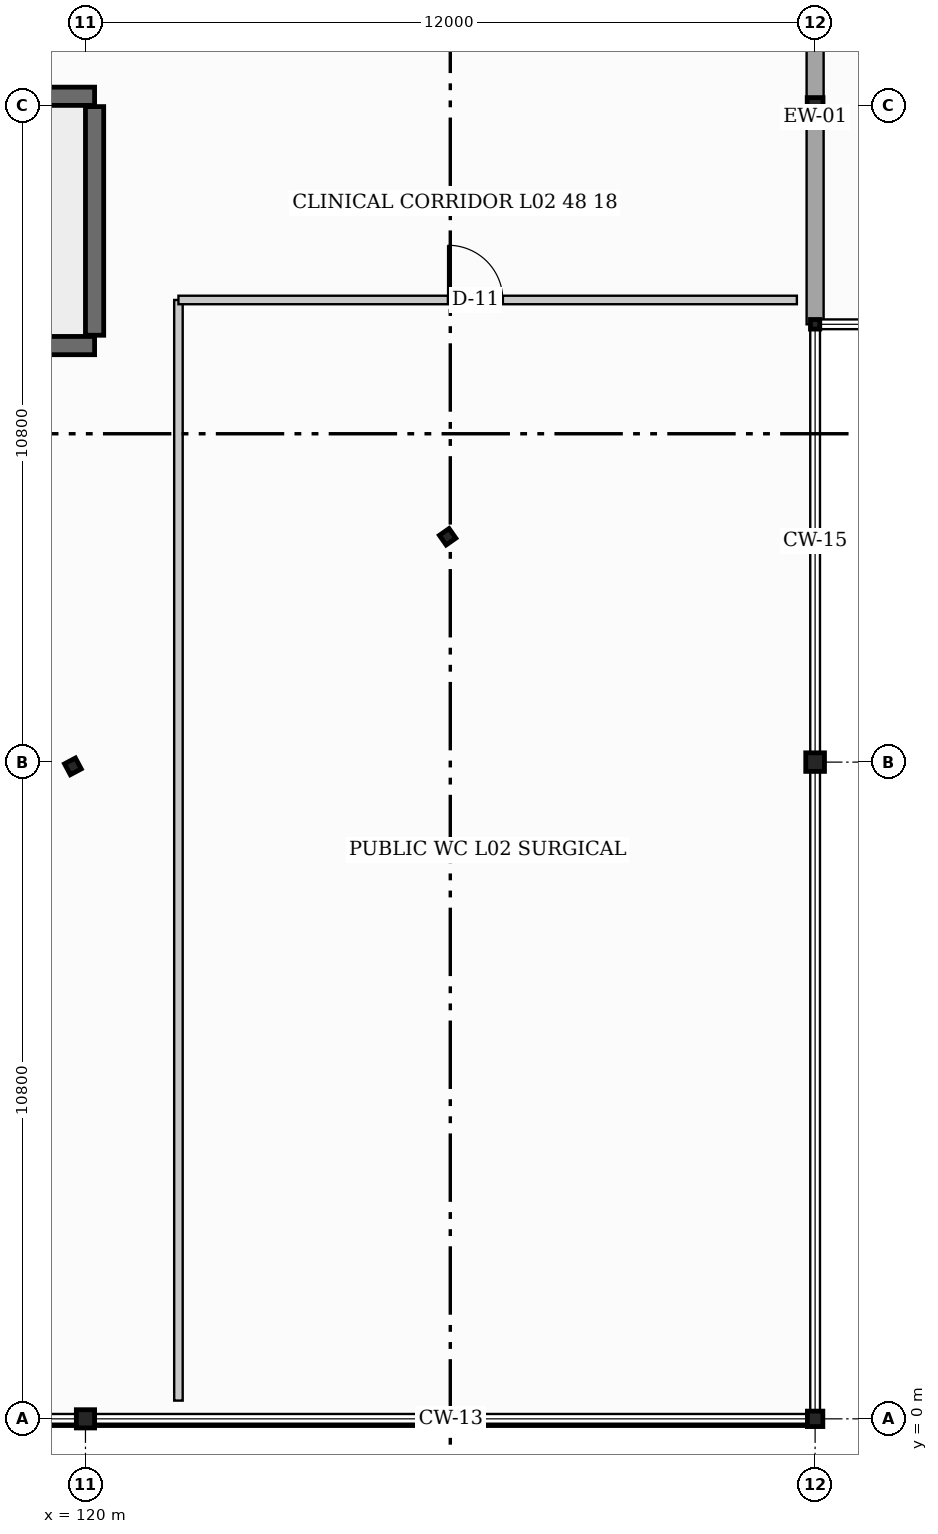
"""IFC4 building model, lengths in metres.
Left out: names, types, materials, properties, quantities, classifications, styles, units other than length and angle.
Written with IfcOpenShell. Run it as: python <this file> out.ifc"""

import sys

from ifc_helpers import new_model, si_unit, direction, frame, frame_2d, origin, origin_2d, place, context, subcontext, project, spatial, rectangle, hollow_rectangle, hollow_circle, i_section, extrude, element, fill, save


model = new_model("IFC4")
c1 = context("Model", 3, precision=1e-05, world=origin(), true_north=direction((0.0, 1.0)))
c2 = subcontext(c1, "Body", "Model", "MODEL_VIEW")
j1 = project(units=[si_unit("LENGTHUNIT", "METRE"), si_unit("PLANEANGLEUNIT", "RADIAN")], contexts=[c1])
p1 = place(None, origin())
s1 = spatial("IfcSite", under=j1, at=p1, CompositionType="ELEMENT")
p2 = place(p1, origin())
s2 = spatial("IfcBuilding", under=s1, at=p2, CompositionType="ELEMENT")
p3 = place(p2, frame((0.0, 0.0, 9.6)))
s3 = spatial("IfcBuildingStorey", under=s2, at=p3, CompositionType="ELEMENT", Elevation=9.6)
p4 = place(p3, frame((120.0, 0.0, 0.0), z_axis=(0.0, 0.0, 1.0), x_axis=(1.0, 0.0, 0.0)))
e1 = element("IfcColumn", 1, at=p4, inside=s3, PredefinedType="COLUMN", context=c2, shape_type="SweptSolid", body=[
    extrude(hollow_rectangle(XDim=0.3, YDim=0.3, WallThickness=0.012, at=origin_2d()), origin(), (0.0, 0.0, 1.0), 4.8),
])
p5 = place(p3, frame((132.0, 0.0, 0.0), z_axis=(0.0, 0.0, 1.0), x_axis=(0.0, 1.0, 0.0)))
e2 = element("IfcColumn", 2, at=p5, inside=s3, PredefinedType="COLUMN", context=c2, shape_type="SweptSolid", body=[
    extrude(i_section(OverallWidth=0.254, OverallDepth=0.254, WebThickness=0.009, FlangeThickness=0.014, at=origin_2d()), origin(), (0.0, 0.0, 1.0), 4.8),
])
p6 = place(p3, frame((132.0, 10.8, 0.0), z_axis=(0.0, 0.0, 1.0), x_axis=(0.0, 1.0, 0.0)))
e3 = element("IfcColumn", 3, at=p6, inside=s3, PredefinedType="COLUMN", context=c2, shape_type="SweptSolid", body=[
    extrude(i_section(OverallWidth=0.305, OverallDepth=0.308, WebThickness=0.01, FlangeThickness=0.015, at=origin_2d()), origin(), (0.0, 0.0, 1.0), 4.8),
])
p7 = place(p3, frame((132.0, 21.6, 0.0), z_axis=(0.0, 0.0, 1.0), x_axis=(0.0, 1.0, 0.0)))
e4 = element("IfcColumn", 4, at=p7, inside=s3, PredefinedType="COLUMN", context=c2, shape_type="SweptSolid", body=[
    extrude(i_section(OverallWidth=0.256, OverallDepth=0.26, WebThickness=0.01, FlangeThickness=0.017, at=origin_2d()), origin(), (0.0, 0.0, 1.0), 4.8),
])
p8 = place(p3, frame((119.793, 10.73, 0.0), z_axis=(0.0, 0.0, 1.0), x_axis=(-0.469471562786, 0.882947592859, 0.0)))
e5 = element("IfcColumn", 5, at=p8, inside=s3, PredefinedType="COLUMN", context=c2, shape_type="SweptSolid", body=[
    extrude(i_section(OverallWidth=0.203, OverallDepth=0.203, WebThickness=0.007, FlangeThickness=0.011, at=origin_2d()), origin(), (0.0, 0.0, 1.0), 4.8),
])
p9 = place(p3, frame((125.956, 14.506, 0.0), z_axis=(0.0, 0.0, 1.0), x_axis=(-0.573576436351, 0.819152044289, 0.0)))
e6 = element("IfcColumn", 6, at=p9, inside=s3, PredefinedType="COLUMN", context=c2, shape_type="SweptSolid", body=[
    extrude(hollow_circle(Radius=0.097, WallThickness=0.008, at=origin_2d()), origin(), (0.0, 0.0, 1.0), 4.8),
])
p10 = place(p3, frame((132.0, 18.0, 0.0), z_axis=(0.0, 0.0, 1.0), x_axis=(1.0, 0.0, 0.0)))
e7 = element("IfcColumn", 7, at=p10, inside=s3, PredefinedType="COLUMN", context=c2, shape_type="SweptSolid", body=[
    extrude(i_section(OverallWidth=0.153, OverallDepth=0.158, WebThickness=0.007, FlangeThickness=0.01, at=origin_2d()), origin(), (0.0, 0.0, 1.0), 4.8),
])
p11 = place(p3, frame((111.45, 17.65, 0.0), z_axis=(0.0, 0.0, 1.0), x_axis=(1.0, 0.0, 0.0)))
e8 = element("IfcWall", 8, at=p11, inside=s3, PredefinedType="SHEAR", context=c2, shape_type="SweptSolid", body=[
    extrude(rectangle(XDim=8.7, YDim=0.3, at=frame_2d((4.35, 0.0))), origin(), (0.0, 0.0, 1.0), 4.8),
])
p12 = place(p11, frame((0.35, 0.0, 0.0)))
e9 = element("IfcOpeningElement", 9, at=p12, cuts=e8, PredefinedType="OPENING", context=c2, shape_type="SweptSolid", body=[
    extrude(rectangle(XDim=1.1, YDim=2.15, at=frame_2d((0.55, 1.075))), frame((0.0, 0.16, 0.0), z_axis=(0.0, -1.0, 0.0), x_axis=(1.0, 0.0, 0.0)), (0.0, 0.0, 1.0), 0.32),
])
p13 = place(p3, frame((120.15, 21.75, 0.0), z_axis=(0.0, 0.0, 1.0), x_axis=(-1.0, 0.0, 0.0)))
e10 = element("IfcWall", 10, at=p13, inside=s3, PredefinedType="SHEAR", context=c2, shape_type="SweptSolid", body=[
    extrude(rectangle(XDim=8.7, YDim=0.3, at=frame_2d((4.35, 0.0))), origin(), (0.0, 0.0, 1.0), 4.8),
])
p14 = place(p3, frame((120.15, 17.82, 0.0), z_axis=(0.0, 0.0, 1.0), x_axis=(0.0, 1.0, 0.0)))
e11 = element("IfcWall", 11, at=p14, inside=s3, PredefinedType="SHEAR", context=c2, shape_type="SweptSolid", body=[
    extrude(rectangle(XDim=3.76, YDim=0.3, at=frame_2d((1.88, 0.0))), origin(), (0.0, 0.0, 1.0), 4.8),
])
p15 = place(p3, frame((132.0, 27.6, 0.0), z_axis=(0.0, 0.0, 1.0), x_axis=(0.0, -1.0, 0.0)))
e12 = element("IfcWall", 12, at=p15, inside=s3, PredefinedType="STANDARD", context=c2, shape_type="SweptSolid", body=[
    extrude(rectangle(XDim=9.6, YDim=0.28, at=frame_2d((4.8, 0.0))), origin(), (0.0, 0.0, 1.0), 3.78),
])
p16 = place(p15, frame((0.681, 0.0, 0.0)))
e13 = element("IfcOpeningElement", 13, at=p16, cuts=e12, PredefinedType="OPENING", context=c2, shape_type="SweptSolid", body=[
    extrude(rectangle(XDim=2.1, YDim=2.25, at=frame_2d((1.05, 1.125))), frame((0.0, 0.15, 0.0), z_axis=(0.0, -1.0, 0.0), x_axis=(1.0, 0.0, 0.0)), (0.0, 0.0, 1.0), 0.3),
])
p17 = place(p3, frame((121.529, 0.3, 0.0), z_axis=(0.0, 0.0, 1.0), x_axis=(0.0, 1.0, 0.0)))
e14 = element("IfcWall", 14, at=p17, inside=s3, PredefinedType="PARTITIONING", context=c2, shape_type="SweptSolid", body=[
    extrude(rectangle(XDim=18.1, YDim=0.14, at=frame_2d((9.05, 0.0))), origin(), (0.0, 0.0, 1.0), 4.012),
])
p18 = place(p3, frame((121.529, 18.4, 0.0), z_axis=(0.0, 0.0, 1.0), x_axis=(1.0, 0.0, 0.0)))
e15 = element("IfcWall", 15, at=p18, inside=s3, PredefinedType="PARTITIONING", context=c2, shape_type="SweptSolid", body=[
    extrude(rectangle(XDim=10.171, YDim=0.14, at=frame_2d((5.085, 0.0))), origin(), (0.0, 0.0, 1.0), 3.465),
])
p19 = place(p18, frame((4.435, 0.0, 0.0)))
e16 = element("IfcOpeningElement", 16, at=p19, cuts=e15, PredefinedType="OPENING", context=c2, shape_type="SweptSolid", body=[
    extrude(rectangle(XDim=0.9, YDim=2.1, at=frame_2d((0.45, 1.05))), frame((0.0, 0.08, 0.0), z_axis=(0.0, -1.0, 0.0), x_axis=(1.0, 0.0, 0.0)), (0.0, 0.0, 1.0), 0.16),
])
p20 = place(p19, origin())
e17 = element("IfcDoor", 17, at=p20, inside=s3, OperationType="SINGLE_SWING_LEFT", PredefinedType="DOOR", context=c2, shape_type="SweptSolid", body=[
    extrude(rectangle(XDim=0.9, YDim=2.1, at=frame_2d((0.45, 1.05))), frame((0.0, 0.025, 0.0), z_axis=(0.0, -1.0, 0.0), x_axis=(1.0, 0.0, 0.0)), (0.0, 0.0, 1.0), 0.05),
])
fill(e16, e17)
save(model, sys.argv[1])
